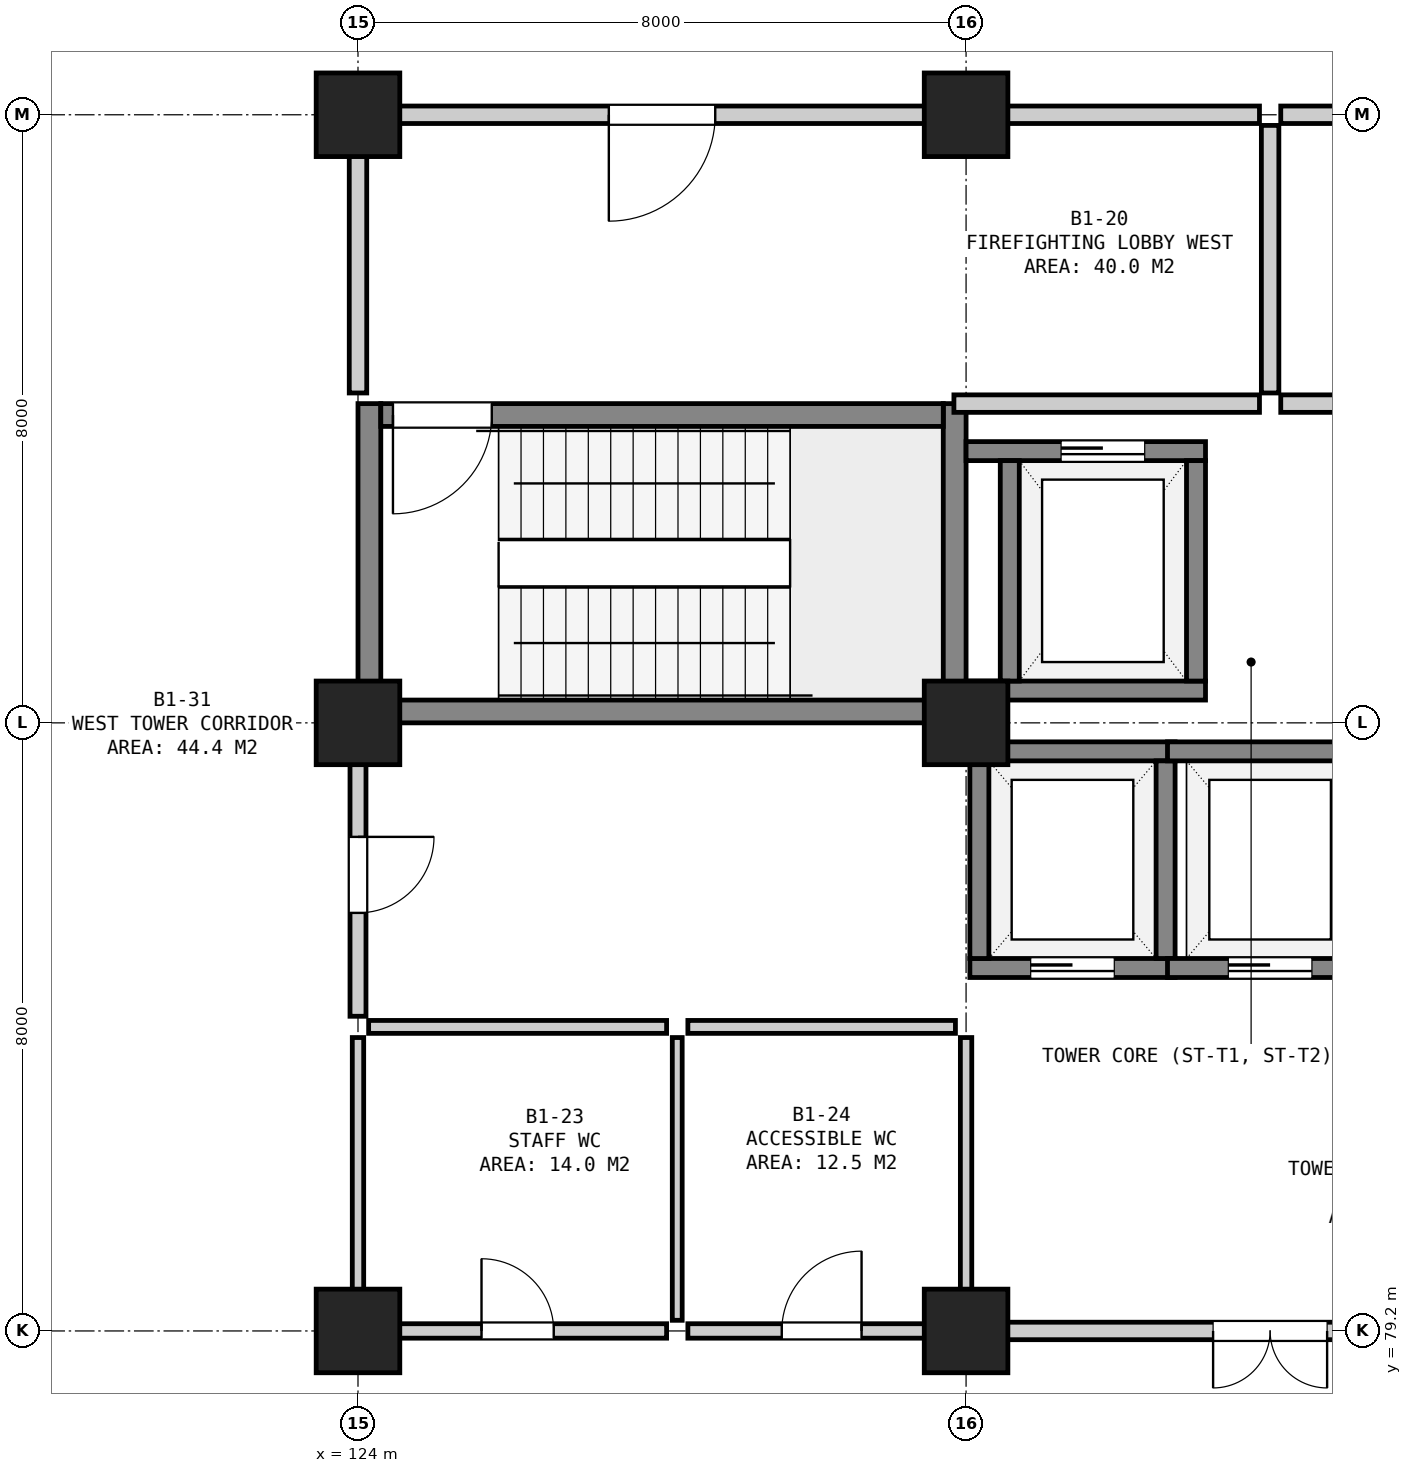
"""IFC4 building model, lengths in metres.
Left out: names, types, materials, properties, quantities, classifications, styles, units other than length and angle.
Written with IfcOpenShell. Run it as: python <this file> out.ifc"""

import sys

from ifc_helpers import new_model, si_unit, direction, frame, frame_2d, origin, origin_2d, place, context, subcontext, project, spatial, rectangle, extrude, element, fill, save


model = new_model("IFC4")
c1 = context("Model", 3, precision=1e-05, world=origin(), true_north=direction((0.0, 1.0)))
c2 = subcontext(c1, "Body", "Model", "MODEL_VIEW")
j1 = project(units=[si_unit("LENGTHUNIT", "METRE"), si_unit("PLANEANGLEUNIT", "RADIAN")], contexts=[c1])
p1 = place(None, origin())
s1 = spatial("IfcSite", under=j1, at=p1, CompositionType="ELEMENT")
p2 = place(p1, origin())
s2 = spatial("IfcBuilding", under=s1, at=p2, CompositionType="ELEMENT")
p3 = place(p2, frame((0.0, 0.0, -4.5)))
s3 = spatial("IfcBuildingStorey", under=s2, at=p3, CompositionType="ELEMENT", Elevation=-4.5)
for number, where, z_axis, x_axis in (
    (1, (124.0, 79.2, 0.0), (0.0, 0.0, 1.0), (1.0, 0.0, 0.0)),
    (2, (124.0, 87.2, 0.0), (0.0, 0.0, 1.0), (1.0, 0.0, 0.0)),
    (3, (124.0, 95.2, 0.0), (0.0, 0.0, 1.0), (1.0, 0.0, 0.0)),
    (4, (132.0, 79.2, 0.0), (0.0, 0.0, 1.0), (1.0, 0.0, 0.0)),
    (5, (132.0, 87.2, 0.0), (0.0, 0.0, 1.0), (1.0, 0.0, 0.0)),
    (6, (132.0, 95.2, 0.0), (0.0, 0.0, 1.0), (1.0, 0.0, 0.0)),
):
    element("IfcColumn", number, at=place(p3, frame(where, z_axis=z_axis, x_axis=x_axis)), inside=s3, PredefinedType="COLUMN", context=c2, shape_type="SweptSolid", body=[
        extrude(rectangle(XDim=1.1, YDim=1.1, at=origin_2d()), origin(), (0.0, 0.0, 1.0), 4.5),
    ])
for number, where, z_axis, x_axis in (
    (7, (124.15, 87.2, 0.0), (0.0, 0.0, 1.0), (0.0, 1.0, 0.0)),
    (8, (131.85, 87.2, 0.0), (0.0, 0.0, 1.0), (0.0, 1.0, 0.0)),
):
    element("IfcWall", number, at=place(p3, frame(where, z_axis=z_axis, x_axis=x_axis)), inside=s3, PredefinedType="SHEAR", context=c2, shape_type="SweptSolid", body=[
        extrude(rectangle(XDim=4.2, YDim=0.3, at=frame_2d((2.1, 0.0))), origin(), (0.0, 0.0, 1.0), 4.08),
    ])
p4 = place(p3, frame((124.3, 87.35, 0.0), z_axis=(0.0, 0.0, 1.0), x_axis=(1.0, 0.0, 0.0)))
e9 = element("IfcWall", 9, at=p4, inside=s3, PredefinedType="SHEAR", context=c2, shape_type="SweptSolid", body=[
    extrude(rectangle(XDim=7.4, YDim=0.3, at=frame_2d((3.7, 0.0))), origin(), (0.0, 0.0, 1.0), 4.08),
])
p5 = place(p3, frame((124.3, 91.25, 0.0), z_axis=(0.0, 0.0, 1.0), x_axis=(1.0, 0.0, 0.0)))
e10 = element("IfcWall", 10, at=p5, inside=s3, PredefinedType="SHEAR", context=c2, shape_type="SweptSolid", body=[
    extrude(rectangle(XDim=7.4, YDim=0.3, at=frame_2d((3.7, 0.0))), origin(), (0.0, 0.0, 1.0), 4.08),
])
p6 = place(p5, frame((0.16, 0.0, 0.0)))
e11 = element("IfcOpeningElement", 11, at=p6, cuts=e10, PredefinedType="OPENING", context=c2, shape_type="SweptSolid", body=[
    extrude(rectangle(XDim=1.3, YDim=2.18, at=frame_2d((0.65, 1.09))), frame((0.0, 0.162, 0.0), z_axis=(0.0, -1.0, 0.0), x_axis=(1.0, 0.0, 0.0)), (0.0, 0.0, 1.0), 0.324),
])
p7 = place(p3, frame((132.0, 87.625, 0.0), z_axis=(0.0, 0.0, 1.0), x_axis=(1.0, 0.0, 0.0)))
e12 = element("IfcWall", 12, at=p7, inside=s3, PredefinedType="SHEAR", context=c2, shape_type="SweptSolid", body=[
    extrude(rectangle(XDim=3.15, YDim=0.25, at=frame_2d((1.575, 0.0))), origin(), (0.0, 0.0, 1.0), 4.08),
])
p8 = place(p3, frame((132.0, 90.775, 0.0), z_axis=(0.0, 0.0, 1.0), x_axis=(1.0, 0.0, 0.0)))
e13 = element("IfcWall", 13, at=p8, inside=s3, PredefinedType="SHEAR", context=c2, shape_type="SweptSolid", body=[
    extrude(rectangle(XDim=3.15, YDim=0.25, at=frame_2d((1.575, 0.0))), origin(), (0.0, 0.0, 1.0), 4.08),
])
p9 = place(p8, frame((1.25, 0.0, 0.0)))
e14 = element("IfcOpeningElement", 14, at=p9, cuts=e13, PredefinedType="OPENING", context=c2, shape_type="SweptSolid", body=[
    extrude(rectangle(XDim=1.1, YDim=2.15, at=frame_2d((0.55, 1.075))), frame((0.0, 0.137, 0.0), z_axis=(0.0, -1.0, 0.0), x_axis=(1.0, 0.0, 0.0)), (0.0, 0.0, 1.0), 0.274),
])
for number, where, z_axis, x_axis in (
    (15, (132.575, 87.75, 0.0), (0.0, 0.0, 1.0), (0.0, 1.0, 0.0)),
    (16, (135.025, 87.75, 0.0), (0.0, 0.0, 1.0), (0.0, 1.0, 0.0)),
):
    element("IfcWall", number, at=place(p3, frame(where, z_axis=z_axis, x_axis=x_axis)), inside=s3, PredefinedType="SHEAR", context=c2, shape_type="SweptSolid", body=[
        extrude(rectangle(XDim=2.9, YDim=0.25, at=frame_2d((1.45, 0.0))), origin(), (0.0, 0.0, 1.0), 4.08),
    ])
p10 = place(p3, frame((132.05, 83.975, 0.0), z_axis=(0.0, 0.0, 1.0), x_axis=(1.0, 0.0, 0.0)))
e17 = element("IfcWall", 17, at=p10, inside=s3, PredefinedType="SHEAR", context=c2, shape_type="SweptSolid", body=[
    extrude(rectangle(XDim=2.7, YDim=0.25, at=frame_2d((1.35, 0.0))), origin(), (0.0, 0.0, 1.0), 4.08),
])
p11 = place(p10, frame((0.8, 0.0, 0.0)))
e18 = element("IfcOpeningElement", 18, at=p11, cuts=e17, PredefinedType="OPENING", context=c2, shape_type="SweptSolid", body=[
    extrude(rectangle(XDim=1.1, YDim=2.15, at=frame_2d((0.55, 1.075))), frame((0.0, 0.137, 0.0), z_axis=(0.0, -1.0, 0.0), x_axis=(1.0, 0.0, 0.0)), (0.0, 0.0, 1.0), 0.274),
])
p12 = place(p3, frame((132.05, 86.825, 0.0), z_axis=(0.0, 0.0, 1.0), x_axis=(1.0, 0.0, 0.0)))
e19 = element("IfcWall", 19, at=p12, inside=s3, PredefinedType="SHEAR", context=c2, shape_type="SweptSolid", body=[
    extrude(rectangle(XDim=2.7, YDim=0.25, at=frame_2d((1.35, 0.0))), origin(), (0.0, 0.0, 1.0), 4.08),
])
for number, where, z_axis, x_axis in (
    (20, (132.175, 84.1, 0.0), (0.0, 0.0, 1.0), (0.0, 1.0, 0.0)),
    (21, (134.625, 84.1, 0.0), (0.0, 0.0, 1.0), (0.0, 1.0, 0.0)),
):
    element("IfcWall", number, at=place(p3, frame(where, z_axis=z_axis, x_axis=x_axis)), inside=s3, PredefinedType="SHEAR", context=c2, shape_type="SweptSolid", body=[
        extrude(rectangle(XDim=2.6, YDim=0.25, at=frame_2d((1.3, 0.0))), origin(), (0.0, 0.0, 1.0), 4.08),
    ])
p13 = place(p3, frame((134.65, 83.975, 0.0), z_axis=(0.0, 0.0, 1.0), x_axis=(1.0, 0.0, 0.0)))
e22 = element("IfcWall", 22, at=p13, inside=s3, PredefinedType="SHEAR", context=c2, shape_type="SweptSolid", body=[
    extrude(rectangle(XDim=2.7, YDim=0.25, at=frame_2d((1.35, 0.0))), origin(), (0.0, 0.0, 1.0), 4.08),
])
p14 = place(p13, frame((0.8, 0.0, 0.0)))
e23 = element("IfcOpeningElement", 23, at=p14, cuts=e22, PredefinedType="OPENING", context=c2, shape_type="SweptSolid", body=[
    extrude(rectangle(XDim=1.1, YDim=2.15, at=frame_2d((0.55, 1.075))), frame((0.0, 0.137, 0.0), z_axis=(0.0, -1.0, 0.0), x_axis=(1.0, 0.0, 0.0)), (0.0, 0.0, 1.0), 0.274),
])
p15 = place(p3, frame((134.65, 86.825, 0.0), z_axis=(0.0, 0.0, 1.0), x_axis=(1.0, 0.0, 0.0)))
e24 = element("IfcWall", 24, at=p15, inside=s3, PredefinedType="SHEAR", context=c2, shape_type="SweptSolid", body=[
    extrude(rectangle(XDim=2.7, YDim=0.25, at=frame_2d((1.35, 0.0))), origin(), (0.0, 0.0, 1.0), 4.08),
])
p16 = place(p3, frame((131.84, 91.4, 0.0), z_axis=(0.0, 0.0, 1.0), x_axis=(1.0, 0.0, 0.0)))
e25 = element("IfcWall", 25, at=p16, inside=s3, PredefinedType="SOLIDWALL", context=c2, shape_type="SweptSolid", body=[
    extrude(rectangle(XDim=4.02, YDim=0.23, at=frame_2d((2.01, 0.0))), origin(), (0.0, 0.0, 1.0), 4.08),
])
p17 = place(p3, frame((124.14, 95.2, 0.0), z_axis=(0.0, 0.0, 1.0), x_axis=(1.0, 0.0, 0.0)))
e26 = element("IfcWall", 26, at=p17, inside=s3, PredefinedType="SOLIDWALL", context=c2, shape_type="SweptSolid", body=[
    extrude(rectangle(XDim=11.72, YDim=0.23, at=frame_2d((5.86, 0.0))), origin(), (0.0, 0.0, 1.0), 3.475),
])
p18 = place(p17, frame((3.16, 0.0, 0.0)))
e27 = element("IfcOpeningElement", 27, at=p18, cuts=e26, PredefinedType="OPENING", context=c2, shape_type="SweptSolid", body=[
    extrude(rectangle(XDim=1.4, YDim=2.2, at=frame_2d((0.7, 1.1))), frame((0.0, 0.127, 0.0), z_axis=(0.0, -1.0, 0.0), x_axis=(1.0, 0.0, 0.0)), (0.0, 0.0, 1.0), 0.254),
])
p19 = place(p3, frame((124.0, 91.54, 0.0), z_axis=(0.0, 0.0, 1.0), x_axis=(0.0, 1.0, 0.0)))
e28 = element("IfcWall", 28, at=p19, inside=s3, PredefinedType="SOLIDWALL", context=c2, shape_type="SweptSolid", body=[
    extrude(rectangle(XDim=3.52, YDim=0.23, at=frame_2d((1.76, 0.0))), origin(), (0.0, 0.0, 1.0), 3.375),
])
p20 = place(p3, frame((136.0, 91.54, 0.0), z_axis=(0.0, 0.0, 1.0), x_axis=(0.0, 1.0, 0.0)))
e29 = element("IfcWall", 29, at=p20, inside=s3, PredefinedType="SOLIDWALL", context=c2, shape_type="SweptSolid", body=[
    extrude(rectangle(XDim=3.52, YDim=0.23, at=frame_2d((1.76, 0.0))), origin(), (0.0, 0.0, 1.0), 4.08),
])
p21 = place(p3, frame((136.14, 91.4, 0.0), z_axis=(0.0, 0.0, 1.0), x_axis=(1.0, 0.0, 0.0)))
e30 = element("IfcWall", 30, at=p21, inside=s3, PredefinedType="SOLIDWALL", context=c2, shape_type="SweptSolid", body=[
    extrude(rectangle(XDim=4.02, YDim=0.23, at=frame_2d((2.01, 0.0))), origin(), (0.0, 0.0, 1.0), 4.08),
])
p22 = place(p3, frame((136.14, 95.2, 0.0), z_axis=(0.0, 0.0, 1.0), x_axis=(1.0, 0.0, 0.0)))
e31 = element("IfcWall", 31, at=p22, inside=s3, PredefinedType="SOLIDWALL", context=c2, shape_type="SweptSolid", body=[
    extrude(rectangle(XDim=11.72, YDim=0.23, at=frame_2d((5.86, 0.0))), origin(), (0.0, 0.0, 1.0), 3.475),
])
p23 = place(p22, frame((7.16, 0.0, 0.0)))
e32 = element("IfcOpeningElement", 32, at=p23, cuts=e31, PredefinedType="OPENING", context=c2, shape_type="SweptSolid", body=[
    extrude(rectangle(XDim=1.4, YDim=2.2, at=frame_2d((0.7, 1.1))), frame((0.0, 0.127, 0.0), z_axis=(0.0, -1.0, 0.0), x_axis=(1.0, 0.0, 0.0)), (0.0, 0.0, 1.0), 0.254),
])
p24 = place(p3, frame((124.14, 79.2, 0.0), z_axis=(0.0, 0.0, 1.0), x_axis=(1.0, 0.0, 0.0)))
e33 = element("IfcWall", 33, at=p24, inside=s3, PredefinedType="PARTITIONING", context=c2, shape_type="SweptSolid", body=[
    extrude(rectangle(XDim=3.92, YDim=0.19, at=frame_2d((1.96, 0.0))), origin(), (0.0, 0.0, 1.0), 3.225),
])
p25 = place(p24, frame((1.485, 0.0, 0.0)))
e34 = element("IfcOpeningElement", 34, at=p25, cuts=e33, PredefinedType="OPENING", context=c2, shape_type="SweptSolid", body=[
    extrude(rectangle(XDim=0.95, YDim=2.15, at=frame_2d((0.475, 1.075))), frame((0.0, 0.107, 0.0), z_axis=(0.0, -1.0, 0.0), x_axis=(1.0, 0.0, 0.0)), (0.0, 0.0, 1.0), 0.214),
])
p26 = place(p3, frame((124.14, 83.2, 0.0), z_axis=(0.0, 0.0, 1.0), x_axis=(1.0, 0.0, 0.0)))
e35 = element("IfcWall", 35, at=p26, inside=s3, PredefinedType="PARTITIONING", context=c2, shape_type="SweptSolid", body=[
    extrude(rectangle(XDim=3.92, YDim=0.17, at=frame_2d((1.96, 0.0))), origin(), (0.0, 0.0, 1.0), 4.08),
])
p27 = place(p3, frame((124.0, 79.34, 0.0), z_axis=(0.0, 0.0, 1.0), x_axis=(0.0, 1.0, 0.0)))
e36 = element("IfcWall", 36, at=p27, inside=s3, PredefinedType="PARTITIONING", context=c2, shape_type="SweptSolid", body=[
    extrude(rectangle(XDim=3.72, YDim=0.15, at=frame_2d((1.86, 0.0))), origin(), (0.0, 0.0, 1.0), 3.325),
])
p28 = place(p3, frame((128.2, 79.34, 0.0), z_axis=(0.0, 0.0, 1.0), x_axis=(0.0, 1.0, 0.0)))
e37 = element("IfcWall", 37, at=p28, inside=s3, PredefinedType="PARTITIONING", context=c2, shape_type="SweptSolid", body=[
    extrude(rectangle(XDim=3.72, YDim=0.13, at=frame_2d((1.86, 0.0))), origin(), (0.0, 0.0, 1.0), 4.08),
])
p29 = place(p3, frame((128.34, 79.2, 0.0), z_axis=(0.0, 0.0, 1.0), x_axis=(1.0, 0.0, 0.0)))
e38 = element("IfcWall", 38, at=p29, inside=s3, PredefinedType="PARTITIONING", context=c2, shape_type="SweptSolid", body=[
    extrude(rectangle(XDim=3.52, YDim=0.19, at=frame_2d((1.76, 0.0))), origin(), (0.0, 0.0, 1.0), 3.225),
])
p30 = place(p29, frame((1.235, 0.0, 0.0)))
e39 = element("IfcOpeningElement", 39, at=p30, cuts=e38, PredefinedType="OPENING", context=c2, shape_type="SweptSolid", body=[
    extrude(rectangle(XDim=1.05, YDim=2.15, at=frame_2d((0.525, 1.075))), frame((0.0, 0.107, 0.0), z_axis=(0.0, -1.0, 0.0), x_axis=(1.0, 0.0, 0.0)), (0.0, 0.0, 1.0), 0.214),
])
p31 = place(p3, frame((128.34, 83.2, 0.0), z_axis=(0.0, 0.0, 1.0), x_axis=(1.0, 0.0, 0.0)))
e40 = element("IfcWall", 40, at=p31, inside=s3, PredefinedType="PARTITIONING", context=c2, shape_type="SweptSolid", body=[
    extrude(rectangle(XDim=3.52, YDim=0.17, at=frame_2d((1.76, 0.0))), origin(), (0.0, 0.0, 1.0), 4.08),
])
p32 = place(p3, frame((132.0, 79.34, 0.0), z_axis=(0.0, 0.0, 1.0), x_axis=(0.0, 1.0, 0.0)))
e41 = element("IfcWall", 41, at=p32, inside=s3, PredefinedType="PARTITIONING", context=c2, shape_type="SweptSolid", body=[
    extrude(rectangle(XDim=3.72, YDim=0.15, at=frame_2d((1.86, 0.0))), origin(), (0.0, 0.0, 1.0), 3.375),
])
p33 = place(p3, frame((124.0, 83.34, 0.0), z_axis=(0.0, 0.0, 1.0), x_axis=(0.0, 1.0, 0.0)))
e42 = element("IfcWall", 42, at=p33, inside=s3, PredefinedType="SOLIDWALL", context=c2, shape_type="SweptSolid", body=[
    extrude(rectangle(XDim=3.72, YDim=0.21, at=frame_2d((1.86, 0.0))), origin(), (0.0, 0.0, 1.0), 3.325),
])
p34 = place(p33, frame((1.36, 0.0, 0.0)))
e43 = element("IfcOpeningElement", 43, at=p34, cuts=e42, PredefinedType="OPENING", context=c2, shape_type="SweptSolid", body=[
    extrude(rectangle(XDim=1.0, YDim=2.15, at=frame_2d((0.5, 1.075))), frame((0.0, 0.117, 0.0), z_axis=(0.0, -1.0, 0.0), x_axis=(1.0, 0.0, 0.0)), (0.0, 0.0, 1.0), 0.234),
])
p35 = place(p3, frame((132.14, 79.2, 0.0), z_axis=(0.0, 0.0, 1.0), x_axis=(1.0, 0.0, 0.0)))
e44 = element("IfcWall", 44, at=p35, inside=s3, PredefinedType="SOLIDWALL", context=c2, shape_type="SweptSolid", body=[
    extrude(rectangle(XDim=7.72, YDim=0.23, at=frame_2d((3.86, 0.0))), origin(), (0.0, 0.0, 1.0), 3.275),
])
p36 = place(p35, frame((3.11, 0.0, 0.0)))
e45 = element("IfcOpeningElement", 45, at=p36, cuts=e44, PredefinedType="OPENING", context=c2, shape_type="SweptSolid", body=[
    extrude(rectangle(XDim=1.5, YDim=2.2, at=frame_2d((0.75, 1.1))), frame((0.0, 0.127, 0.0), z_axis=(0.0, -1.0, 0.0), x_axis=(1.0, 0.0, 0.0)), (0.0, 0.0, 1.0), 0.254),
])
p37 = place(p6, frame((1.3, 0.0, 0.0), z_axis=(0.0, 0.0, 1.0), x_axis=(-1.0, 0.0, 0.0)))
e46 = element("IfcDoor", 46, at=p37, inside=s3, OperationType="SINGLE_SWING_RIGHT", PredefinedType="DOOR", context=c2, shape_type="SweptSolid", body=[
    extrude(rectangle(XDim=1.3, YDim=2.18, at=frame_2d((0.65, 1.09))), frame((0.0, 0.025, 0.0), z_axis=(0.0, -1.0, 0.0), x_axis=(1.0, 0.0, 0.0)), (0.0, 0.0, 1.0), 0.05),
])
fill(e11, e46)
p38 = place(p9, origin())
e47 = element("IfcDoor", 47, at=p38, inside=s3, OperationType="SLIDING_TO_LEFT", PredefinedType="DOOR", context=c2, shape_type="SweptSolid", body=[
    extrude(rectangle(XDim=1.1, YDim=2.15, at=frame_2d((0.55, 1.075))), frame((0.0, 0.025, 0.0), z_axis=(0.0, -1.0, 0.0), x_axis=(1.0, 0.0, 0.0)), (0.0, 0.0, 1.0), 0.05),
])
fill(e14, e47)
p39 = place(p11, origin())
e48 = element("IfcDoor", 48, at=p39, inside=s3, OperationType="SLIDING_TO_LEFT", PredefinedType="DOOR", context=c2, shape_type="SweptSolid", body=[
    extrude(rectangle(XDim=1.1, YDim=2.15, at=frame_2d((0.55, 1.075))), frame((0.0, 0.025, 0.0), z_axis=(0.0, -1.0, 0.0), x_axis=(1.0, 0.0, 0.0)), (0.0, 0.0, 1.0), 0.05),
])
fill(e18, e48)
p40 = place(p14, origin())
e49 = element("IfcDoor", 49, at=p40, inside=s3, OperationType="SLIDING_TO_LEFT", PredefinedType="DOOR", context=c2, shape_type="SweptSolid", body=[
    extrude(rectangle(XDim=1.1, YDim=2.15, at=frame_2d((0.55, 1.075))), frame((0.0, 0.025, 0.0), z_axis=(0.0, -1.0, 0.0), x_axis=(1.0, 0.0, 0.0)), (0.0, 0.0, 1.0), 0.05),
])
fill(e23, e49)
p41 = place(p18, frame((1.4, 0.0, 0.0), z_axis=(0.0, 0.0, 1.0), x_axis=(-1.0, 0.0, 0.0)))
e50 = element("IfcDoor", 50, at=p41, inside=s3, OperationType="SINGLE_SWING_RIGHT", PredefinedType="DOOR", context=c2, shape_type="SweptSolid", body=[
    extrude(rectangle(XDim=1.4, YDim=2.2, at=frame_2d((0.7, 1.1))), frame((0.0, 0.025, 0.0), z_axis=(0.0, -1.0, 0.0), x_axis=(1.0, 0.0, 0.0)), (0.0, 0.0, 1.0), 0.05),
])
fill(e27, e50)
p42 = place(p25, origin())
e51 = element("IfcDoor", 51, at=p42, inside=s3, OperationType="SINGLE_SWING_LEFT", PredefinedType="DOOR", context=c2, shape_type="SweptSolid", body=[
    extrude(rectangle(XDim=0.95, YDim=2.15, at=frame_2d((0.475, 1.075))), frame((0.0, 0.025, 0.0), z_axis=(0.0, -1.0, 0.0), x_axis=(1.0, 0.0, 0.0)), (0.0, 0.0, 1.0), 0.05),
])
fill(e34, e51)
p43 = place(p30, origin())
e52 = element("IfcDoor", 52, at=p43, inside=s3, OperationType="SINGLE_SWING_RIGHT", PredefinedType="DOOR", context=c2, shape_type="SweptSolid", body=[
    extrude(rectangle(XDim=1.05, YDim=2.15, at=frame_2d((0.525, 1.075))), frame((0.0, 0.025, 0.0), z_axis=(0.0, -1.0, 0.0), x_axis=(1.0, 0.0, 0.0)), (0.0, 0.0, 1.0), 0.05),
])
fill(e39, e52)
p44 = place(p34, frame((1.0, 0.0, 0.0), z_axis=(0.0, 0.0, 1.0), x_axis=(-1.0, 0.0, 0.0)))
e53 = element("IfcDoor", 53, at=p44, inside=s3, OperationType="SINGLE_SWING_LEFT", PredefinedType="DOOR", context=c2, shape_type="SweptSolid", body=[
    extrude(rectangle(XDim=1.0, YDim=2.15, at=frame_2d((0.5, 1.075))), frame((0.0, 0.025, 0.0), z_axis=(0.0, -1.0, 0.0), x_axis=(1.0, 0.0, 0.0)), (0.0, 0.0, 1.0), 0.05),
])
fill(e43, e53)
p45 = place(p36, frame((1.5, 0.0, 0.0), z_axis=(0.0, 0.0, 1.0), x_axis=(-1.0, 0.0, 0.0)))
e54 = element("IfcDoor", 54, at=p45, inside=s3, OperationType="DOUBLE_DOOR_SINGLE_SWING", PredefinedType="DOOR", context=c2, shape_type="SweptSolid", body=[
    extrude(rectangle(XDim=1.5, YDim=2.2, at=frame_2d((0.75, 1.1))), frame((0.0, 0.025, 0.0), z_axis=(0.0, -1.0, 0.0), x_axis=(1.0, 0.0, 0.0)), (0.0, 0.0, 1.0), 0.05),
])
fill(e45, e54)
save(model, sys.argv[1])
